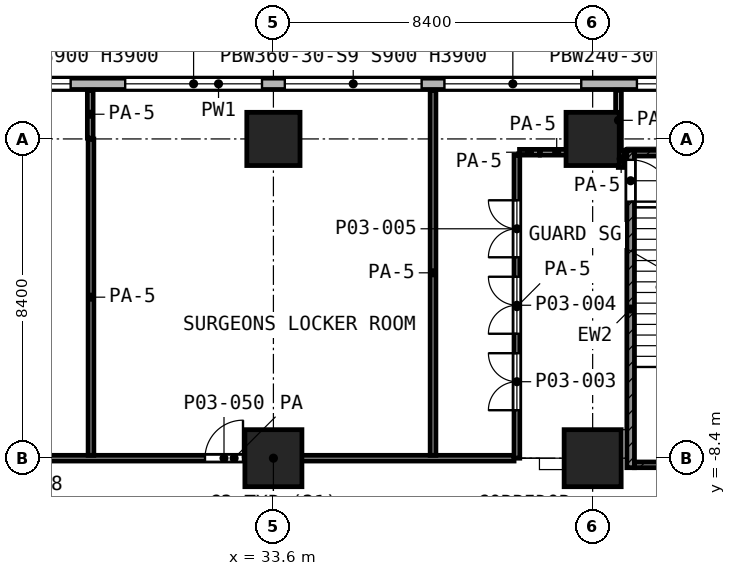
"""IFC4 building model, lengths in metres.
Left out: names, types, materials, properties, quantities, classifications, styles, units other than length and angle.
Written with IfcOpenShell. Run it as: python <this file> out.ifc"""

import sys

from ifc_helpers import new_model, si_unit, direction, frame, frame_2d, origin, origin_2d, place, context, subcontext, project, spatial, rectangle, extrude, element, fill, save


model = new_model("IFC4")
c1 = context("Model", 3, precision=1e-05, world=origin(), true_north=direction((0.0, 1.0)))
c2 = subcontext(c1, "Body", "Model", "MODEL_VIEW")
j1 = project(units=[si_unit("LENGTHUNIT", "METRE"), si_unit("PLANEANGLEUNIT", "RADIAN")], contexts=[c1])
p1 = place(None, origin())
s1 = spatial("IfcSite", under=j1, at=p1, CompositionType="ELEMENT")
p2 = place(p1, origin())
s2 = spatial("IfcBuilding", under=s1, at=p2, CompositionType="ELEMENT")
p3 = place(p2, frame((0.0, 0.0, 12.6)))
s3 = spatial("IfcBuildingStorey", under=s2, at=p3, CompositionType="ELEMENT", Elevation=12.6)
for number, where, z_axis, x_axis in (
    (1, (33.6, 0.0, 0.0), (0.0, 0.0, 1.0), (1.0, 0.0, 0.0)),
    (2, (42.0, 0.0, 0.0), (0.0, 0.0, 1.0), (1.0, 0.0, 0.0)),
):
    element("IfcColumn", number, at=place(p3, frame(where, z_axis=z_axis, x_axis=x_axis)), inside=s3, PredefinedType="COLUMN", context=c2, shape_type="SweptSolid", body=[
        extrude(rectangle(XDim=1.4, YDim=1.4, at=origin_2d()), origin(), (0.0, 0.0, 1.0), 5.6),
    ])
for number, where, z_axis, x_axis in (
    (3, (33.6, -8.4, 0.0), (0.0, 0.0, 1.0), (1.0, 0.0, 0.0)),
    (4, (42.0, -8.4, 0.0), (0.0, 0.0, 1.0), (1.0, 0.0, 0.0)),
):
    element("IfcColumn", number, at=place(p3, frame(where, z_axis=z_axis, x_axis=x_axis)), inside=s3, PredefinedType="COLUMN", context=c2, shape_type="SweptSolid", body=[
        extrude(rectangle(XDim=1.5, YDim=1.5, at=origin_2d()), origin(), (0.0, 0.0, 1.0), 5.6),
    ])
p4 = place(p3, frame((59.85, 1.45, 0.0), z_axis=(0.0, 0.0, 1.0), x_axis=(-1.0, 0.0, 0.0)))
e5 = element("IfcWall", 5, at=p4, inside=s3, PredefinedType="SOLIDWALL", context=c2, shape_type="SweptSolid", body=[
    extrude(rectangle(XDim=55.388, YDim=0.3, at=frame_2d((27.694, 0.0))), origin(), (0.0, 0.0, 1.0), 5.25),
])
p5 = place(p4, frame((1.35, 0.0, 0.9)))
e6 = element("IfcOpeningElement", 6, at=p5, cuts=e5, PredefinedType="OPENING", context=c2, shape_type="SweptSolid", body=[
    extrude(rectangle(XDim=3.6, YDim=3.0, at=frame_2d((1.8, 1.5))), frame((0.0, 0.16, 0.0), z_axis=(0.0, -1.0, 0.0), x_axis=(1.0, 0.0, 0.0)), (0.0, 0.0, 1.0), 0.32),
])
p6 = place(p4, frame((6.235, 0.0, 0.9)))
e7 = element("IfcOpeningElement", 7, at=p6, cuts=e5, PredefinedType="OPENING", context=c2, shape_type="SweptSolid", body=[
    extrude(rectangle(XDim=2.4, YDim=3.0, at=frame_2d((1.2, 1.5))), frame((0.0, 0.16, 0.0), z_axis=(0.0, -1.0, 0.0), x_axis=(1.0, 0.0, 0.0)), (0.0, 0.0, 1.0), 0.32),
])
p7 = place(p4, frame((9.75, 0.0, 0.9)))
e8 = element("IfcOpeningElement", 8, at=p7, cuts=e5, PredefinedType="OPENING", context=c2, shape_type="SweptSolid", body=[
    extrude(rectangle(XDim=3.6, YDim=3.0, at=frame_2d((1.8, 1.5))), frame((0.0, 0.16, 0.0), z_axis=(0.0, -1.0, 0.0), x_axis=(1.0, 0.0, 0.0)), (0.0, 0.0, 1.0), 0.32),
])
p8 = place(p4, frame((14.285, 0.0, 0.9)))
e9 = element("IfcOpeningElement", 9, at=p8, cuts=e5, PredefinedType="OPENING", context=c2, shape_type="SweptSolid", body=[
    extrude(rectangle(XDim=2.4, YDim=3.0, at=frame_2d((1.2, 1.5))), frame((0.0, 0.16, 0.0), z_axis=(0.0, -1.0, 0.0), x_axis=(1.0, 0.0, 0.0)), (0.0, 0.0, 1.0), 0.32),
])
p9 = place(p4, frame((18.15, 0.0, 0.9)))
e10 = element("IfcOpeningElement", 10, at=p9, cuts=e5, PredefinedType="OPENING", context=c2, shape_type="SweptSolid", body=[
    extrude(rectangle(XDim=3.6, YDim=3.0, at=frame_2d((1.8, 1.5))), frame((0.0, 0.16, 0.0), z_axis=(0.0, -1.0, 0.0), x_axis=(1.0, 0.0, 0.0)), (0.0, 0.0, 1.0), 0.32),
])
p10 = place(p4, frame((22.35, 0.0, 0.9)))
e11 = element("IfcOpeningElement", 11, at=p10, cuts=e5, PredefinedType="OPENING", context=c2, shape_type="SweptSolid", body=[
    extrude(rectangle(XDim=3.6, YDim=3.0, at=frame_2d((1.8, 1.5))), frame((0.0, 0.16, 0.0), z_axis=(0.0, -1.0, 0.0), x_axis=(1.0, 0.0, 0.0)), (0.0, 0.0, 1.0), 0.32),
])
p11 = place(p4, frame((26.55, 0.0, 0.9)))
e12 = element("IfcOpeningElement", 12, at=p11, cuts=e5, PredefinedType="OPENING", context=c2, shape_type="SweptSolid", body=[
    extrude(rectangle(XDim=3.6, YDim=3.0, at=frame_2d((1.8, 1.5))), frame((0.0, 0.16, 0.0), z_axis=(0.0, -1.0, 0.0), x_axis=(1.0, 0.0, 0.0)), (0.0, 0.0, 1.0), 0.32),
])
p12 = place(p4, frame((31.585, 0.0, 0.9)))
e13 = element("IfcOpeningElement", 13, at=p12, cuts=e5, PredefinedType="OPENING", context=c2, shape_type="SweptSolid", body=[
    extrude(rectangle(XDim=2.4, YDim=3.0, at=frame_2d((1.2, 1.5))), frame((0.0, 0.16, 0.0), z_axis=(0.0, -1.0, 0.0), x_axis=(1.0, 0.0, 0.0)), (0.0, 0.0, 1.0), 0.32),
])
p13 = place(p4, frame((34.95, 0.0, 0.9)))
e14 = element("IfcOpeningElement", 14, at=p13, cuts=e5, PredefinedType="OPENING", context=c2, shape_type="SweptSolid", body=[
    extrude(rectangle(XDim=3.6, YDim=3.0, at=frame_2d((1.8, 1.5))), frame((0.0, 0.16, 0.0), z_axis=(0.0, -1.0, 0.0), x_axis=(1.0, 0.0, 0.0)), (0.0, 0.0, 1.0), 0.32),
])
p14 = place(p4, frame((39.15, 0.0, 0.9)))
e15 = element("IfcOpeningElement", 15, at=p14, cuts=e5, PredefinedType="OPENING", context=c2, shape_type="SweptSolid", body=[
    extrude(rectangle(XDim=3.6, YDim=3.0, at=frame_2d((1.8, 1.5))), frame((0.0, 0.16, 0.0), z_axis=(0.0, -1.0, 0.0), x_axis=(1.0, 0.0, 0.0)), (0.0, 0.0, 1.0), 0.32),
])
p15 = place(p4, frame((43.35, 0.0, 0.9)))
e16 = element("IfcOpeningElement", 16, at=p15, cuts=e5, PredefinedType="OPENING", context=c2, shape_type="SweptSolid", body=[
    extrude(rectangle(XDim=3.6, YDim=3.0, at=frame_2d((1.8, 1.5))), frame((0.0, 0.16, 0.0), z_axis=(0.0, -1.0, 0.0), x_axis=(1.0, 0.0, 0.0)), (0.0, 0.0, 1.0), 0.32),
])
p16 = place(p4, frame((47.55, 0.0, 0.9)))
e17 = element("IfcOpeningElement", 17, at=p16, cuts=e5, PredefinedType="OPENING", context=c2, shape_type="SweptSolid", body=[
    extrude(rectangle(XDim=3.6, YDim=3.0, at=frame_2d((1.8, 1.5))), frame((0.0, 0.16, 0.0), z_axis=(0.0, -1.0, 0.0), x_axis=(1.0, 0.0, 0.0)), (0.0, 0.0, 1.0), 0.32),
])
p17 = place(p4, frame((52.25, 0.0, 0.9)))
e18 = element("IfcOpeningElement", 18, at=p17, cuts=e5, PredefinedType="OPENING", context=c2, shape_type="SweptSolid", body=[
    extrude(rectangle(XDim=2.4, YDim=3.0, at=frame_2d((1.2, 1.5))), frame((0.0, 0.16, 0.0), z_axis=(0.0, -1.0, 0.0), x_axis=(1.0, 0.0, 0.0)), (0.0, 0.0, 1.0), 0.32),
])
p18 = place(p3, frame((43.0, -8.65, 0.0), z_axis=(0.0, 0.0, 1.0), x_axis=(0.0, 1.0, 0.0)))
e19 = element("IfcWall", 19, at=p18, inside=s3, PredefinedType="SHEAR", context=c2, shape_type="SweptSolid", body=[
    extrude(rectangle(XDim=8.35, YDim=0.2, at=frame_2d((4.175, 0.0))), origin(), (0.0, 0.0, 1.0), 5.25),
])
p19 = place(p18, frame((7.0, 0.0, 0.0)))
e20 = element("IfcOpeningElement", 20, at=p19, cuts=e19, PredefinedType="OPENING", context=c2, shape_type="SweptSolid", body=[
    extrude(rectangle(XDim=1.1, YDim=2.1, at=frame_2d((0.55, 1.05))), frame((0.0, 0.11, 0.0), z_axis=(0.0, -1.0, 0.0), x_axis=(1.0, 0.0, 0.0)), (0.0, 0.0, 1.0), 0.22),
])
for number, where, z_axis, x_axis in (
    (21, (43.1, -0.375, 0.0), (0.0, 0.0, 1.0), (1.0, 0.0, 0.0)),
    (22, (43.1, -8.575, 0.0), (0.0, 0.0, 1.0), (1.0, 0.0, 0.0)),
):
    element("IfcWall", number, at=place(p3, frame(where, z_axis=z_axis, x_axis=x_axis)), inside=s3, PredefinedType="SHEAR", context=c2, shape_type="SweptSolid", body=[
        extrude(rectangle(XDim=2.85, YDim=0.15, at=frame_2d((1.425, 0.0))), origin(), (0.0, 0.0, 1.0), 5.25),
    ])
p20 = place(p3, frame((25.2, -8.4, 0.0), z_axis=(0.0, 0.0, 1.0), x_axis=(1.0, 0.0, 0.0)))
e23 = element("IfcWall", 23, at=p20, inside=s3, PredefinedType="PARTITIONING", context=c2, shape_type="SweptSolid", body=[
    extrude(rectangle(XDim=14.732, YDim=0.15, at=frame_2d((7.366, 0.0))), origin(), (0.0, 0.0, 1.0), 5.25),
])
p21 = place(p20, frame((1.2, 0.0, 0.0)))
e24 = element("IfcOpeningElement", 24, at=p21, cuts=e23, PredefinedType="OPENING", context=c2, shape_type="SweptSolid", body=[
    extrude(rectangle(XDim=1.2, YDim=2.1, at=frame_2d((0.6, 1.05))), frame((0.0, 0.085, 0.0), z_axis=(0.0, -1.0, 0.0), x_axis=(1.0, 0.0, 0.0)), (0.0, 0.0, 1.0), 0.17),
])
p22 = place(p20, frame((6.6, 0.0, 0.0)))
e25 = element("IfcOpeningElement", 25, at=p22, cuts=e23, PredefinedType="OPENING", context=c2, shape_type="SweptSolid", body=[
    extrude(rectangle(XDim=1.0, YDim=2.1, at=frame_2d((0.5, 1.05))), frame((0.0, 0.085, 0.0), z_axis=(0.0, -1.0, 0.0), x_axis=(1.0, 0.0, 0.0)), (0.0, 0.0, 1.0), 0.17),
])
p23 = place(p3, frame((40.076, -0.35, 0.0), z_axis=(0.0, 0.0, 1.0), x_axis=(1.0, 0.0, 0.0)))
e26 = element("IfcWall", 26, at=p23, inside=s3, PredefinedType="PARTITIONING", context=c2, shape_type="SweptSolid", body=[
    extrude(rectangle(XDim=0.524, YDim=0.15, at=frame_2d((0.262, 0.0))), origin(), (0.0, 0.0, 1.0), 3.85),
])
p24 = place(p3, frame((40.62, -0.35, 0.0), z_axis=(0.0, 0.0, 1.0), x_axis=(1.0, 0.0, 0.0)))
e27 = element("IfcWall", 27, at=p24, inside=s3, PredefinedType="PARTITIONING", context=c2, shape_type="SweptSolid", body=[
    extrude(rectangle(XDim=0.868, YDim=0.15, at=frame_2d((0.434, 0.0))), origin(), (0.0, 0.0, 1.0), 3.85),
])
p25 = place(p3, frame((28.78, 0.02, 0.0), z_axis=(0.0, 0.0, 1.0), x_axis=(0.0, 1.0, 0.0)))
e28 = element("IfcWall", 28, at=p25, inside=s3, PredefinedType="PARTITIONING", context=c2, shape_type="SweptSolid", body=[
    extrude(rectangle(XDim=1.26, YDim=0.15, at=frame_2d((0.63, 0.0))), origin(), (0.0, 0.0, 1.0), 3.85),
])
p26 = place(p3, frame((28.8, -8.325, 0.0), z_axis=(0.0, 0.0, 1.0), x_axis=(0.0, 1.0, 0.0)))
e29 = element("IfcWall", 29, at=p26, inside=s3, PredefinedType="PARTITIONING", context=c2, shape_type="SweptSolid", body=[
    extrude(rectangle(XDim=8.323, YDim=0.15, at=frame_2d((4.162, 0.0))), origin(), (0.0, 0.0, 1.0), 3.85),
])
p27 = place(p3, frame((37.8, -8.325, 0.0), z_axis=(0.0, 0.0, 1.0), x_axis=(0.0, 1.0, 0.0)))
e30 = element("IfcWall", 30, at=p27, inside=s3, PredefinedType="PARTITIONING", context=c2, shape_type="SweptSolid", body=[
    extrude(rectangle(XDim=9.605, YDim=0.15, at=frame_2d((4.802, 0.0))), origin(), (0.0, 0.0, 1.0), 3.85),
])
p28 = place(p3, frame((40.007, -8.4, 0.0), z_axis=(0.0, 0.0, 1.0), x_axis=(0.0, 1.0, 0.0)))
e31 = element("IfcWall", 31, at=p28, inside=s3, PredefinedType="PARTITIONING", context=c2, shape_type="SweptSolid", body=[
    extrude(rectangle(XDim=7.975, YDim=0.15, at=frame_2d((3.987, 0.0))), origin(), (0.0, 0.0, 1.0), 3.85),
])
p29 = place(p28, frame((1.262, 0.0, 0.0)))
e32 = element("IfcOpeningElement", 32, at=p29, cuts=e31, PredefinedType="OPENING", context=c2, shape_type="SweptSolid", body=[
    extrude(rectangle(XDim=1.5, YDim=2.1, at=frame_2d((0.75, 1.05))), frame((0.0, 0.085, 0.0), z_axis=(0.0, -1.0, 0.0), x_axis=(1.0, 0.0, 0.0)), (0.0, 0.0, 1.0), 0.17),
])
p30 = place(p28, frame((3.274, 0.0, 0.0)))
e33 = element("IfcOpeningElement", 33, at=p30, cuts=e31, PredefinedType="OPENING", context=c2, shape_type="SweptSolid", body=[
    extrude(rectangle(XDim=1.5, YDim=2.1, at=frame_2d((0.75, 1.05))), frame((0.0, 0.085, 0.0), z_axis=(0.0, -1.0, 0.0), x_axis=(1.0, 0.0, 0.0)), (0.0, 0.0, 1.0), 0.17),
])
p31 = place(p28, frame((5.286, 0.0, 0.0)))
e34 = element("IfcOpeningElement", 34, at=p31, cuts=e31, PredefinedType="OPENING", context=c2, shape_type="SweptSolid", body=[
    extrude(rectangle(XDim=1.5, YDim=2.1, at=frame_2d((0.75, 1.05))), frame((0.0, 0.085, 0.0), z_axis=(0.0, -1.0, 0.0), x_axis=(1.0, 0.0, 0.0)), (0.0, 0.0, 1.0), 0.17),
])
p32 = place(p3, frame((42.68, -0.3, 0.0), z_axis=(0.0, 0.0, 1.0), x_axis=(0.0, 1.0, 0.0)))
e35 = element("IfcWall", 35, at=p32, inside=s3, PredefinedType="PARTITIONING", context=c2, shape_type="SweptSolid", body=[
    extrude(rectangle(XDim=1.58, YDim=0.15, at=frame_2d((0.79, 0.0))), origin(), (0.0, 0.0, 1.0), 3.85),
])
p33 = place(p3, frame((42.75, -0.75, 0.0), z_axis=(0.0, 0.0, 1.0), x_axis=(0.0, 1.0, 0.0)))
e36 = element("IfcWall", 36, at=p33, inside=s3, PredefinedType="PARTITIONING", context=c2, shape_type="SweptSolid", body=[
    extrude(rectangle(XDim=0.45, YDim=0.15, at=frame_2d((0.225, 0.0))), origin(), (0.0, 0.0, 1.0), 3.85),
])
p34 = place(p8, origin())
e37 = element("IfcWindow", 37, at=p34, inside=s3, PartitioningType="SINGLE_PANEL", PredefinedType="WINDOW", context=c2, shape_type="SweptSolid", body=[
    extrude(rectangle(XDim=2.4, YDim=3.0, at=frame_2d((1.2, 1.5))), frame((0.0, 0.03, 0.0), z_axis=(0.0, -1.0, 0.0), x_axis=(1.0, 0.0, 0.0)), (0.0, 0.0, 1.0), 0.06),
])
fill(e9, e37)
p35 = place(p9, origin())
e38 = element("IfcWindow", 38, at=p35, inside=s3, PartitioningType="SINGLE_PANEL", PredefinedType="WINDOW", context=c2, shape_type="SweptSolid", body=[
    extrude(rectangle(XDim=3.6, YDim=3.0, at=frame_2d((1.8, 1.5))), frame((0.0, 0.03, 0.0), z_axis=(0.0, -1.0, 0.0), x_axis=(1.0, 0.0, 0.0)), (0.0, 0.0, 1.0), 0.06),
])
fill(e10, e38)
p36 = place(p10, origin())
e39 = element("IfcWindow", 39, at=p36, inside=s3, PartitioningType="SINGLE_PANEL", PredefinedType="WINDOW", context=c2, shape_type="SweptSolid", body=[
    extrude(rectangle(XDim=3.6, YDim=3.0, at=frame_2d((1.8, 1.5))), frame((0.0, 0.03, 0.0), z_axis=(0.0, -1.0, 0.0), x_axis=(1.0, 0.0, 0.0)), (0.0, 0.0, 1.0), 0.06),
])
fill(e11, e39)
p37 = place(p11, origin())
e40 = element("IfcWindow", 40, at=p37, inside=s3, PartitioningType="SINGLE_PANEL", PredefinedType="WINDOW", context=c2, shape_type="SweptSolid", body=[
    extrude(rectangle(XDim=3.6, YDim=3.0, at=frame_2d((1.8, 1.5))), frame((0.0, 0.03, 0.0), z_axis=(0.0, -1.0, 0.0), x_axis=(1.0, 0.0, 0.0)), (0.0, 0.0, 1.0), 0.06),
])
fill(e12, e40)
p38 = place(p12, origin())
e41 = element("IfcWindow", 41, at=p38, inside=s3, PartitioningType="SINGLE_PANEL", PredefinedType="WINDOW", context=c2, shape_type="SweptSolid", body=[
    extrude(rectangle(XDim=2.4, YDim=3.0, at=frame_2d((1.2, 1.5))), frame((0.0, 0.03, 0.0), z_axis=(0.0, -1.0, 0.0), x_axis=(1.0, 0.0, 0.0)), (0.0, 0.0, 1.0), 0.06),
])
fill(e13, e41)
p39 = place(p19, frame((1.1, 0.0, 0.0), z_axis=(0.0, 0.0, 1.0), x_axis=(-1.0, 0.0, 0.0)))
e42 = element("IfcDoor", 42, at=p39, inside=s3, OperationType="SINGLE_SWING_LEFT", PredefinedType="DOOR", context=c2, shape_type="SweptSolid", body=[
    extrude(rectangle(XDim=1.1, YDim=2.1, at=frame_2d((0.55, 1.05))), frame((0.0, 0.025, 0.0), z_axis=(0.0, -1.0, 0.0), x_axis=(1.0, 0.0, 0.0)), (0.0, 0.0, 1.0), 0.05),
])
fill(e20, e42)
p40 = place(p22, origin())
e43 = element("IfcDoor", 43, at=p40, inside=s3, OperationType="SINGLE_SWING_RIGHT", PredefinedType="DOOR", context=c2, shape_type="SweptSolid", body=[
    extrude(rectangle(XDim=1.0, YDim=2.1, at=frame_2d((0.5, 1.05))), frame((0.0, 0.025, 0.0), z_axis=(0.0, -1.0, 0.0), x_axis=(1.0, 0.0, 0.0)), (0.0, 0.0, 1.0), 0.05),
])
fill(e25, e43)
p41 = place(p29, origin())
e44 = element("IfcDoor", 44, at=p41, inside=s3, OperationType="DOUBLE_DOOR_SINGLE_SWING", PredefinedType="DOOR", context=c2, shape_type="SweptSolid", body=[
    extrude(rectangle(XDim=1.5, YDim=2.1, at=frame_2d((0.75, 1.05))), frame((0.0, 0.025, 0.0), z_axis=(0.0, -1.0, 0.0), x_axis=(1.0, 0.0, 0.0)), (0.0, 0.0, 1.0), 0.05),
])
fill(e32, e44)
p42 = place(p30, origin())
e45 = element("IfcDoor", 45, at=p42, inside=s3, OperationType="DOUBLE_DOOR_SINGLE_SWING", PredefinedType="DOOR", context=c2, shape_type="SweptSolid", body=[
    extrude(rectangle(XDim=1.5, YDim=2.1, at=frame_2d((0.75, 1.05))), frame((0.0, 0.025, 0.0), z_axis=(0.0, -1.0, 0.0), x_axis=(1.0, 0.0, 0.0)), (0.0, 0.0, 1.0), 0.05),
])
fill(e33, e45)
p43 = place(p31, origin())
e46 = element("IfcDoor", 46, at=p43, inside=s3, OperationType="DOUBLE_DOOR_SINGLE_SWING", PredefinedType="DOOR", context=c2, shape_type="SweptSolid", body=[
    extrude(rectangle(XDim=1.5, YDim=2.1, at=frame_2d((0.75, 1.05))), frame((0.0, 0.025, 0.0), z_axis=(0.0, -1.0, 0.0), x_axis=(1.0, 0.0, 0.0)), (0.0, 0.0, 1.0), 0.05),
])
fill(e34, e46)
save(model, sys.argv[1])
